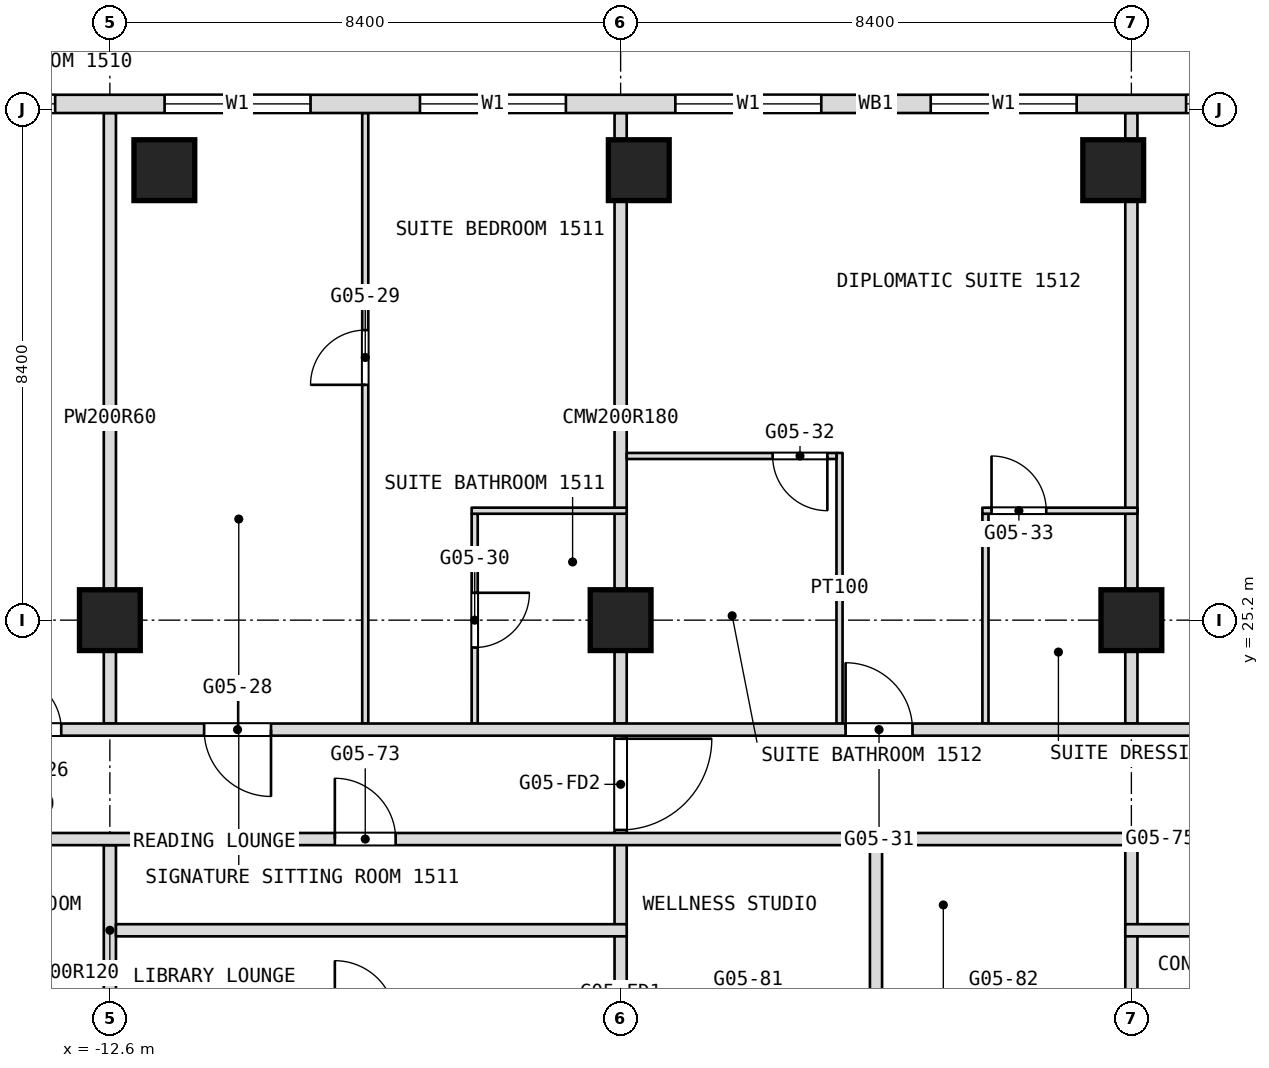
"""IFC4 building model, lengths in metres.
Left out: names, types, materials, properties, quantities, classifications, styles, units other than length and angle.
Written with IfcOpenShell. Run it as: python <this file> out.ifc"""

import sys

from ifc_helpers import new_model, si_unit, direction, frame, frame_2d, origin, origin_2d, place, context, subcontext, project, spatial, rectangle, extrude, element, fill, save


model = new_model("IFC4")
c1 = context("Model", 3, precision=1e-05, world=origin(), true_north=direction((0.0, 1.0)))
c2 = subcontext(c1, "Body", "Model", "MODEL_VIEW")
j1 = project(units=[si_unit("LENGTHUNIT", "METRE"), si_unit("PLANEANGLEUNIT", "RADIAN")], contexts=[c1])
p1 = place(None, origin())
s1 = spatial("IfcSite", under=j1, at=p1, CompositionType="ELEMENT")
p2 = place(p1, origin())
s2 = spatial("IfcBuilding", under=s1, at=p2, CompositionType="ELEMENT")
p3 = place(p2, frame((0.0, 0.0, 68.9)))
s3 = spatial("IfcBuildingStorey", under=s2, at=p3, CompositionType="ELEMENT", Elevation=68.9)
for number, where, z_axis, x_axis in (
    (1, (-12.6, 25.2, 0.0), (0.0, 0.0, 1.0), (1.0, 0.0, 0.0)),
    (2, (-4.2, 25.2, 0.0), (0.0, 0.0, 1.0), (1.0, 0.0, 0.0)),
    (3, (4.2, 25.2, 0.0), (0.0, 0.0, 1.0), (1.0, 0.0, 0.0)),
    (4, (-11.704, 32.6, 0.0), (0.0, 0.0, 1.0), (1.0, 0.0, 0.0)),
    (5, (-3.901, 32.6, 0.0), (0.0, 0.0, 1.0), (1.0, 0.0, 0.0)),
    (6, (3.901, 32.6, 0.0), (0.0, 0.0, 1.0), (1.0, 0.0, 0.0)),
):
    element("IfcColumn", number, at=place(p3, frame(where, z_axis=z_axis, x_axis=x_axis)), inside=s3, PredefinedType="COLUMN", context=c2, shape_type="SweptSolid", body=[
        extrude(rectangle(XDim=1.0, YDim=1.0, at=origin_2d()), origin(), (0.0, 0.0, 1.0), 3.6),
    ])
p4 = place(p3, frame((4.2, 18.7, 0.0), z_axis=(0.0, 0.0, 1.0), x_axis=(0.0, 1.0, 0.0)))
e7 = element("IfcWall", 7, at=p4, inside=s3, PredefinedType="PARTITIONING", context=c2, shape_type="SweptSolid", body=[
    extrude(rectangle(XDim=2.8, YDim=0.2, at=frame_2d((1.4, 0.0))), origin(), (0.0, 0.0, 1.0), 3.34),
])
p5 = place(p3, frame((4.2, 23.5, 0.0), z_axis=(0.0, 0.0, 1.0), x_axis=(0.0, 1.0, 0.0)))
e8 = element("IfcWall", 8, at=p5, inside=s3, PredefinedType="PARTITIONING", context=c2, shape_type="SweptSolid", body=[
    extrude(rectangle(XDim=10.04, YDim=0.2, at=frame_2d((5.02, 0.0))), origin(), (0.0, 0.0, 1.0), 3.34),
])
p6 = place(p3, frame((1.8, 23.5, 0.0), z_axis=(0.0, 0.0, 1.0), x_axis=(0.0, 1.0, 0.0)))
e9 = element("IfcWall", 9, at=p6, inside=s3, PredefinedType="PARTITIONING", context=c2, shape_type="SweptSolid", body=[
    extrude(rectangle(XDim=3.45, YDim=0.1, at=frame_2d((1.725, 0.0))), origin(), (0.0, 0.0, 1.0), 3.34),
])
p7 = place(p3, frame((0.0, 18.7, 0.0), z_axis=(0.0, 0.0, 1.0), x_axis=(0.0, 1.0, 0.0)))
e10 = element("IfcWall", 10, at=p7, inside=s3, PredefinedType="PARTITIONING", context=c2, shape_type="SweptSolid", body=[
    extrude(rectangle(XDim=2.8, YDim=0.2, at=frame_2d((1.4, 0.0))), origin(), (0.0, 0.0, 1.0), 3.34),
])
p8 = place(p3, frame((-0.6, 23.5, 0.0), z_axis=(0.0, 0.0, 1.0), x_axis=(0.0, 1.0, 0.0)))
e11 = element("IfcWall", 11, at=p8, inside=s3, PredefinedType="PARTITIONING", context=c2, shape_type="SweptSolid", body=[
    extrude(rectangle(XDim=4.45, YDim=0.1, at=frame_2d((2.225, 0.0))), origin(), (0.0, 0.0, 1.0), 3.34),
])
p9 = place(p3, frame((-4.2, 16.8, 0.0), z_axis=(0.0, 0.0, 1.0), x_axis=(0.0, 1.0, 0.0)))
e12 = element("IfcWall", 12, at=p9, inside=s3, PredefinedType="PARTITIONING", context=c2, shape_type="SweptSolid", body=[
    extrude(rectangle(XDim=6.7, YDim=0.2, at=frame_2d((3.35, 0.0))), origin(), (0.0, 0.0, 1.0), 3.34),
])
p10 = place(p9, frame((0.15, 0.0, 0.0)))
e13 = element("IfcOpeningElement", 13, at=p10, cuts=e12, PredefinedType="OPENING", context=c2, shape_type="SweptSolid", body=[
    extrude(rectangle(XDim=1.5, YDim=2.1, at=frame_2d((0.75, 1.05))), frame((0.0, 0.1, 0.0), z_axis=(0.0, -1.0, 0.0), x_axis=(1.0, 0.0, 0.0)), (0.0, 0.0, 1.0), 0.2),
])
p11 = place(p9, frame((4.95, 0.0, 0.0)))
e14 = element("IfcOpeningElement", 14, at=p11, cuts=e12, PredefinedType="OPENING", context=c2, shape_type="SweptSolid", body=[
    extrude(rectangle(XDim=1.5, YDim=2.1, at=frame_2d((0.75, 1.05))), frame((0.0, 0.1, 0.0), z_axis=(0.0, -1.0, 0.0), x_axis=(1.0, 0.0, 0.0)), (0.0, 0.0, 1.0), 0.2),
])
p12 = place(p3, frame((-4.2, 23.5, 0.0), z_axis=(0.0, 0.0, 1.0), x_axis=(0.0, 1.0, 0.0)))
e15 = element("IfcWall", 15, at=p12, inside=s3, PredefinedType="PARTITIONING", context=c2, shape_type="SweptSolid", body=[
    extrude(rectangle(XDim=10.04, YDim=0.2, at=frame_2d((5.02, 0.0))), origin(), (0.0, 0.0, 1.0), 3.34),
])
p13 = place(p3, frame((-6.6, 23.5, 0.0), z_axis=(0.0, 0.0, 1.0), x_axis=(0.0, 1.0, 0.0)))
e16 = element("IfcWall", 16, at=p13, inside=s3, PredefinedType="PARTITIONING", context=c2, shape_type="SweptSolid", body=[
    extrude(rectangle(XDim=3.45, YDim=0.1, at=frame_2d((1.725, 0.0))), origin(), (0.0, 0.0, 1.0), 3.34),
])
p14 = place(p13, frame((1.25, 0.0, 0.0)))
e17 = element("IfcOpeningElement", 17, at=p14, cuts=e16, PredefinedType="OPENING", context=c2, shape_type="SweptSolid", body=[
    extrude(rectangle(XDim=0.9, YDim=2.1, at=frame_2d((0.45, 1.05))), frame((0.0, 0.05, 0.0), z_axis=(0.0, -1.0, 0.0), x_axis=(1.0, 0.0, 0.0)), (0.0, 0.0, 1.0), 0.1),
])
p15 = place(p3, frame((-8.4, 23.5, 0.0), z_axis=(0.0, 0.0, 1.0), x_axis=(0.0, 1.0, 0.0)))
e18 = element("IfcWall", 18, at=p15, inside=s3, PredefinedType="PARTITIONING", context=c2, shape_type="SweptSolid", body=[
    extrude(rectangle(XDim=10.04, YDim=0.1, at=frame_2d((5.02, 0.0))), origin(), (0.0, 0.0, 1.0), 3.34),
])
p16 = place(p15, frame((5.57, 0.0, 0.0)))
e19 = element("IfcOpeningElement", 19, at=p16, cuts=e18, PredefinedType="OPENING", context=c2, shape_type="SweptSolid", body=[
    extrude(rectangle(XDim=0.9, YDim=2.1, at=frame_2d((0.45, 1.05))), frame((0.0, 0.05, 0.0), z_axis=(0.0, -1.0, 0.0), x_axis=(1.0, 0.0, 0.0)), (0.0, 0.0, 1.0), 0.1),
])
p17 = place(p3, frame((-12.6, 18.7, 0.0), z_axis=(0.0, 0.0, 1.0), x_axis=(0.0, 1.0, 0.0)))
e20 = element("IfcWall", 20, at=p17, inside=s3, PredefinedType="PARTITIONING", context=c2, shape_type="SweptSolid", body=[
    extrude(rectangle(XDim=2.8, YDim=0.2, at=frame_2d((1.4, 0.0))), origin(), (0.0, 0.0, 1.0), 3.34),
])
p18 = place(p3, frame((-12.6, 23.5, 0.0), z_axis=(0.0, 0.0, 1.0), x_axis=(0.0, 1.0, 0.0)))
e21 = element("IfcWall", 21, at=p18, inside=s3, PredefinedType="PARTITIONING", context=c2, shape_type="SweptSolid", body=[
    extrude(rectangle(XDim=10.04, YDim=0.2, at=frame_2d((5.02, 0.0))), origin(), (0.0, 0.0, 1.0), 3.34),
])
p19 = place(p3, frame((-12.5, 20.1, 0.0), z_axis=(0.0, 0.0, 1.0), x_axis=(1.0, 0.0, 0.0)))
e22 = element("IfcWall", 22, at=p19, inside=s3, PredefinedType="PARTITIONING", context=c2, shape_type="SweptSolid", body=[
    extrude(rectangle(XDim=8.4, YDim=0.2, at=frame_2d((4.2, 0.0))), origin(), (0.0, 0.0, 1.0), 3.34),
])
p20 = place(p3, frame((4.1, 20.1, 0.0), z_axis=(0.0, 0.0, 1.0), x_axis=(1.0, 0.0, 0.0)))
e23 = element("IfcWall", 23, at=p20, inside=s3, PredefinedType="PARTITIONING", context=c2, shape_type="SweptSolid", body=[
    extrude(rectangle(XDim=3.9, YDim=0.2, at=frame_2d((1.95, 0.0))), origin(), (0.0, 0.0, 1.0), 3.34),
])
p21 = place(p3, frame((-16.7, 21.6, 0.0), z_axis=(0.0, 0.0, 1.0), x_axis=(1.0, 0.0, 0.0)))
e24 = element("IfcWall", 24, at=p21, inside=s3, PredefinedType="PARTITIONING", context=c2, shape_type="SweptSolid", body=[
    extrude(rectangle(XDim=24.7, YDim=0.2, at=frame_2d((12.35, 0.0))), origin(), (0.0, 0.0, 1.0), 3.34),
])
p22 = place(p21, frame((7.8, 0.0, 0.0)))
e25 = element("IfcOpeningElement", 25, at=p22, cuts=e24, PredefinedType="OPENING", context=c2, shape_type="SweptSolid", body=[
    extrude(rectangle(XDim=1.0, YDim=2.1, at=frame_2d((0.5, 1.05))), frame((0.0, 0.1, 0.0), z_axis=(0.0, -1.0, 0.0), x_axis=(1.0, 0.0, 0.0)), (0.0, 0.0, 1.0), 0.2),
])
p23 = place(p21, frame((22.25, 0.0, 0.0)))
e26 = element("IfcOpeningElement", 26, at=p23, cuts=e24, PredefinedType="OPENING", context=c2, shape_type="SweptSolid", body=[
    extrude(rectangle(XDim=1.0, YDim=2.1, at=frame_2d((0.5, 1.05))), frame((0.0, 0.1, 0.0), z_axis=(0.0, -1.0, 0.0), x_axis=(1.0, 0.0, 0.0)), (0.0, 0.0, 1.0), 0.2),
])
p24 = place(p3, frame((-16.7, 23.4, 0.0), z_axis=(0.0, 0.0, 1.0), x_axis=(1.0, 0.0, 0.0)))
e27 = element("IfcWall", 27, at=p24, inside=s3, PredefinedType="PARTITIONING", context=c2, shape_type="SweptSolid", body=[
    extrude(rectangle(XDim=23.4, YDim=0.2, at=frame_2d((11.7, 0.0))), origin(), (0.0, 0.0, 1.0), 3.34),
])
p25 = place(p24, frame((2.4, 0.0, 0.0)))
e28 = element("IfcOpeningElement", 28, at=p25, cuts=e27, PredefinedType="OPENING", context=c2, shape_type="SweptSolid", body=[
    extrude(rectangle(XDim=0.9, YDim=2.1, at=frame_2d((0.45, 1.05))), frame((0.0, 0.1, 0.0), z_axis=(0.0, -1.0, 0.0), x_axis=(1.0, 0.0, 0.0)), (0.0, 0.0, 1.0), 0.2),
])
p26 = place(p24, frame((5.65, 0.0, 0.0)))
e29 = element("IfcOpeningElement", 29, at=p26, cuts=e27, PredefinedType="OPENING", context=c2, shape_type="SweptSolid", body=[
    extrude(rectangle(XDim=1.1, YDim=2.1, at=frame_2d((0.55, 1.05))), frame((0.0, 0.1, 0.0), z_axis=(0.0, -1.0, 0.0), x_axis=(1.0, 0.0, 0.0)), (0.0, 0.0, 1.0), 0.2),
])
p27 = place(p24, frame((16.2, 0.0, 0.0)))
e30 = element("IfcOpeningElement", 30, at=p27, cuts=e27, PredefinedType="OPENING", context=c2, shape_type="SweptSolid", body=[
    extrude(rectangle(XDim=1.1, YDim=2.1, at=frame_2d((0.55, 1.05))), frame((0.0, 0.1, 0.0), z_axis=(0.0, -1.0, 0.0), x_axis=(1.0, 0.0, 0.0)), (0.0, 0.0, 1.0), 0.2),
])
p28 = place(p3, frame((-6.65, 27.0, 0.0), z_axis=(0.0, 0.0, 1.0), x_axis=(1.0, 0.0, 0.0)))
e31 = element("IfcWall", 31, at=p28, inside=s3, PredefinedType="PARTITIONING", context=c2, shape_type="SweptSolid", body=[
    extrude(rectangle(XDim=2.55, YDim=0.1, at=frame_2d((1.275, 0.0))), origin(), (0.0, 0.0, 1.0), 3.34),
])
p29 = place(p3, frame((1.75, 27.0, 0.0), z_axis=(0.0, 0.0, 1.0), x_axis=(1.0, 0.0, 0.0)))
e32 = element("IfcWall", 32, at=p29, inside=s3, PredefinedType="PARTITIONING", context=c2, shape_type="SweptSolid", body=[
    extrude(rectangle(XDim=2.55, YDim=0.1, at=frame_2d((1.275, 0.0))), origin(), (0.0, 0.0, 1.0), 3.34),
])
p30 = place(p29, frame((0.15, 0.0, 0.0)))
e33 = element("IfcOpeningElement", 33, at=p30, cuts=e32, PredefinedType="OPENING", context=c2, shape_type="SweptSolid", body=[
    extrude(rectangle(XDim=0.9, YDim=2.1, at=frame_2d((0.45, 1.05))), frame((0.0, 0.05, 0.0), z_axis=(0.0, -1.0, 0.0), x_axis=(1.0, 0.0, 0.0)), (0.0, 0.0, 1.0), 0.1),
])
p31 = place(p3, frame((-4.1, 27.9, 0.0), z_axis=(0.0, 0.0, 1.0), x_axis=(1.0, 0.0, 0.0)))
e34 = element("IfcWall", 34, at=p31, inside=s3, PredefinedType="PARTITIONING", context=c2, shape_type="SweptSolid", body=[
    extrude(rectangle(XDim=3.45, YDim=0.1, at=frame_2d((1.725, 0.0))), origin(), (0.0, 0.0, 1.0), 3.34),
])
p32 = place(p31, frame((2.4, 0.0, 0.0)))
e35 = element("IfcOpeningElement", 35, at=p32, cuts=e34, PredefinedType="OPENING", context=c2, shape_type="SweptSolid", body=[
    extrude(rectangle(XDim=0.9, YDim=2.1, at=frame_2d((0.45, 1.05))), frame((0.0, 0.05, 0.0), z_axis=(0.0, -1.0, 0.0), x_axis=(1.0, 0.0, 0.0)), (0.0, 0.0, 1.0), 0.1),
])
p33 = place(p3, frame((23.406, 33.69, 0.0), z_axis=(0.0, 0.0, 1.0), x_axis=(-1.0, 0.0, 0.0)))
e36 = element("IfcWall", 36, at=p33, inside=s3, PredefinedType="NOTDEFINED", context=c2, shape_type="SweptSolid", body=[
    extrude(rectangle(XDim=46.812, YDim=0.3, at=frame_2d((23.406, 0.0))), origin(), (0.0, 0.0, 1.0), 3.6),
])
p34 = place(p33, frame((2.186, 0.0, 0.9)))
e37 = element("IfcOpeningElement", 37, at=p34, cuts=e36, PredefinedType="OPENING", context=c2, shape_type="SweptSolid", body=[
    extrude(rectangle(XDim=2.4, YDim=2.1, at=frame_2d((1.2, 1.05))), frame((0.0, 0.15, 0.0), z_axis=(0.0, -1.0, 0.0), x_axis=(1.0, 0.0, 0.0)), (0.0, 0.0, 1.0), 0.3),
])
p35 = place(p33, frame((7.506, 0.0, 0.9)))
e38 = element("IfcOpeningElement", 38, at=p35, cuts=e36, PredefinedType="OPENING", context=c2, shape_type="SweptSolid", body=[
    extrude(rectangle(XDim=2.4, YDim=2.1, at=frame_2d((1.2, 1.05))), frame((0.0, 0.15, 0.0), z_axis=(0.0, -1.0, 0.0), x_axis=(1.0, 0.0, 0.0)), (0.0, 0.0, 1.0), 0.3),
])
p36 = place(p33, frame((11.706, 0.0, 0.9)))
e39 = element("IfcOpeningElement", 39, at=p36, cuts=e36, PredefinedType="OPENING", context=c2, shape_type="SweptSolid", body=[
    extrude(rectangle(XDim=2.4, YDim=2.1, at=frame_2d((1.2, 1.05))), frame((0.0, 0.15, 0.0), z_axis=(0.0, -1.0, 0.0), x_axis=(1.0, 0.0, 0.0)), (0.0, 0.0, 1.0), 0.3),
])
p37 = place(p33, frame((15.906, 0.0, 0.9)))
e40 = element("IfcOpeningElement", 40, at=p37, cuts=e36, PredefinedType="OPENING", context=c2, shape_type="SweptSolid", body=[
    extrude(rectangle(XDim=2.4, YDim=2.1, at=frame_2d((1.2, 1.05))), frame((0.0, 0.15, 0.0), z_axis=(0.0, -1.0, 0.0), x_axis=(1.0, 0.0, 0.0)), (0.0, 0.0, 1.0), 0.3),
])
p38 = place(p33, frame((20.106, 0.0, 0.9)))
e41 = element("IfcOpeningElement", 41, at=p38, cuts=e36, PredefinedType="OPENING", context=c2, shape_type="SweptSolid", body=[
    extrude(rectangle(XDim=2.4, YDim=2.1, at=frame_2d((1.2, 1.05))), frame((0.0, 0.15, 0.0), z_axis=(0.0, -1.0, 0.0), x_axis=(1.0, 0.0, 0.0)), (0.0, 0.0, 1.0), 0.3),
])
p39 = place(p33, frame((24.306, 0.0, 0.9)))
e42 = element("IfcOpeningElement", 42, at=p39, cuts=e36, PredefinedType="OPENING", context=c2, shape_type="SweptSolid", body=[
    extrude(rectangle(XDim=2.4, YDim=2.1, at=frame_2d((1.2, 1.05))), frame((0.0, 0.15, 0.0), z_axis=(0.0, -1.0, 0.0), x_axis=(1.0, 0.0, 0.0)), (0.0, 0.0, 1.0), 0.3),
])
p40 = place(p33, frame((28.506, 0.0, 0.9)))
e43 = element("IfcOpeningElement", 43, at=p40, cuts=e36, PredefinedType="OPENING", context=c2, shape_type="SweptSolid", body=[
    extrude(rectangle(XDim=2.4, YDim=2.1, at=frame_2d((1.2, 1.05))), frame((0.0, 0.15, 0.0), z_axis=(0.0, -1.0, 0.0), x_axis=(1.0, 0.0, 0.0)), (0.0, 0.0, 1.0), 0.3),
])
p41 = place(p33, frame((32.706, 0.0, 0.9)))
e44 = element("IfcOpeningElement", 44, at=p41, cuts=e36, PredefinedType="OPENING", context=c2, shape_type="SweptSolid", body=[
    extrude(rectangle(XDim=2.4, YDim=2.1, at=frame_2d((1.2, 1.05))), frame((0.0, 0.15, 0.0), z_axis=(0.0, -1.0, 0.0), x_axis=(1.0, 0.0, 0.0)), (0.0, 0.0, 1.0), 0.3),
])
p42 = place(p33, frame((36.906, 0.0, 0.9)))
e45 = element("IfcOpeningElement", 45, at=p42, cuts=e36, PredefinedType="OPENING", context=c2, shape_type="SweptSolid", body=[
    extrude(rectangle(XDim=2.4, YDim=2.1, at=frame_2d((1.2, 1.05))), frame((0.0, 0.15, 0.0), z_axis=(0.0, -1.0, 0.0), x_axis=(1.0, 0.0, 0.0)), (0.0, 0.0, 1.0), 0.3),
])
p43 = place(p33, frame((42.226, 0.0, 0.9)))
e46 = element("IfcOpeningElement", 46, at=p43, cuts=e36, PredefinedType="OPENING", context=c2, shape_type="SweptSolid", body=[
    extrude(rectangle(XDim=2.4, YDim=2.1, at=frame_2d((1.2, 1.05))), frame((0.0, 0.15, 0.0), z_axis=(0.0, -1.0, 0.0), x_axis=(1.0, 0.0, 0.0)), (0.0, 0.0, 1.0), 0.3),
])
p44 = place(p14, origin())
e47 = element("IfcDoor", 47, at=p44, inside=s3, OperationType="SINGLE_SWING_RIGHT", PredefinedType="DOOR", context=c2, shape_type="SweptSolid", body=[
    extrude(rectangle(XDim=0.9, YDim=2.1, at=frame_2d((0.45, 1.05))), frame((0.0, 0.025, 0.0), z_axis=(0.0, -1.0, 0.0), x_axis=(1.0, 0.0, 0.0)), (0.0, 0.0, 1.0), 0.05),
])
fill(e17, e47)
p45 = place(p16, origin())
e48 = element("IfcDoor", 48, at=p45, inside=s3, OperationType="SINGLE_SWING_RIGHT", PredefinedType="DOOR", context=c2, shape_type="SweptSolid", body=[
    extrude(rectangle(XDim=0.9, YDim=2.1, at=frame_2d((0.45, 1.05))), frame((0.0, 0.025, 0.0), z_axis=(0.0, -1.0, 0.0), x_axis=(1.0, 0.0, 0.0)), (0.0, 0.0, 1.0), 0.05),
])
fill(e19, e48)
p46 = place(p22, origin())
e49 = element("IfcDoor", 49, at=p46, inside=s3, OperationType="SINGLE_SWING_RIGHT", PredefinedType="DOOR", context=c2, shape_type="SweptSolid", body=[
    extrude(rectangle(XDim=1.0, YDim=2.1, at=frame_2d((0.5, 1.05))), frame((0.0, 0.025, 0.0), z_axis=(0.0, -1.0, 0.0), x_axis=(1.0, 0.0, 0.0)), (0.0, 0.0, 1.0), 0.05),
])
fill(e25, e49)
p47 = place(p25, origin())
e50 = element("IfcDoor", 50, at=p47, inside=s3, OperationType="SINGLE_SWING_LEFT", PredefinedType="DOOR", context=c2, shape_type="SweptSolid", body=[
    extrude(rectangle(XDim=0.9, YDim=2.1, at=frame_2d((0.45, 1.05))), frame((0.0, 0.025, 0.0), z_axis=(0.0, -1.0, 0.0), x_axis=(1.0, 0.0, 0.0)), (0.0, 0.0, 1.0), 0.05),
])
fill(e28, e50)
p48 = place(p26, origin())
e51 = element("IfcDoor", 51, at=p48, inside=s3, OperationType="SINGLE_SWING_LEFT", PredefinedType="DOOR", context=c2, shape_type="SweptSolid", body=[
    extrude(rectangle(XDim=1.1, YDim=2.1, at=frame_2d((0.55, 1.05))), frame((0.0, 0.025, 0.0), z_axis=(0.0, -1.0, 0.0), x_axis=(1.0, 0.0, 0.0)), (0.0, 0.0, 1.0), 0.05),
])
fill(e29, e51)
p49 = place(p27, origin())
e52 = element("IfcDoor", 52, at=p49, inside=s3, OperationType="SINGLE_SWING_LEFT", PredefinedType="DOOR", context=c2, shape_type="SweptSolid", body=[
    extrude(rectangle(XDim=1.1, YDim=2.1, at=frame_2d((0.55, 1.05))), frame((0.0, 0.025, 0.0), z_axis=(0.0, -1.0, 0.0), x_axis=(1.0, 0.0, 0.0)), (0.0, 0.0, 1.0), 0.05),
])
fill(e30, e52)
p50 = place(p30, origin())
e53 = element("IfcDoor", 53, at=p50, inside=s3, OperationType="SINGLE_SWING_RIGHT", PredefinedType="DOOR", context=c2, shape_type="SweptSolid", body=[
    extrude(rectangle(XDim=0.9, YDim=2.1, at=frame_2d((0.45, 1.05))), frame((0.0, 0.025, 0.0), z_axis=(0.0, -1.0, 0.0), x_axis=(1.0, 0.0, 0.0)), (0.0, 0.0, 1.0), 0.05),
])
fill(e33, e53)
p51 = place(p32, origin())
e54 = element("IfcDoor", 54, at=p51, inside=s3, OperationType="SINGLE_SWING_LEFT", PredefinedType="DOOR", context=c2, shape_type="SweptSolid", body=[
    extrude(rectangle(XDim=0.9, YDim=2.1, at=frame_2d((0.45, 1.05))), frame((0.0, 0.025, 0.0), z_axis=(0.0, -1.0, 0.0), x_axis=(1.0, 0.0, 0.0)), (0.0, 0.0, 1.0), 0.05),
])
fill(e35, e54)
p52 = place(p37, origin())
e55 = element("IfcWindow", 55, at=p52, inside=s3, PartitioningType="SINGLE_PANEL", PredefinedType="WINDOW", context=c2, shape_type="SweptSolid", body=[
    extrude(rectangle(XDim=2.4, YDim=2.1, at=frame_2d((1.2, 1.05))), frame((0.0, 0.03, 0.0), z_axis=(0.0, -1.0, 0.0), x_axis=(1.0, 0.0, 0.0)), (0.0, 0.0, 1.0), 0.06),
])
fill(e40, e55)
p53 = place(p38, origin())
e56 = element("IfcWindow", 56, at=p53, inside=s3, PartitioningType="SINGLE_PANEL", PredefinedType="WINDOW", context=c2, shape_type="SweptSolid", body=[
    extrude(rectangle(XDim=2.4, YDim=2.1, at=frame_2d((1.2, 1.05))), frame((0.0, 0.03, 0.0), z_axis=(0.0, -1.0, 0.0), x_axis=(1.0, 0.0, 0.0)), (0.0, 0.0, 1.0), 0.06),
])
fill(e41, e56)
p54 = place(p39, origin())
e57 = element("IfcWindow", 57, at=p54, inside=s3, PartitioningType="SINGLE_PANEL", PredefinedType="WINDOW", context=c2, shape_type="SweptSolid", body=[
    extrude(rectangle(XDim=2.4, YDim=2.1, at=frame_2d((1.2, 1.05))), frame((0.0, 0.03, 0.0), z_axis=(0.0, -1.0, 0.0), x_axis=(1.0, 0.0, 0.0)), (0.0, 0.0, 1.0), 0.06),
])
fill(e42, e57)
p55 = place(p40, origin())
e58 = element("IfcWindow", 58, at=p55, inside=s3, PartitioningType="SINGLE_PANEL", PredefinedType="WINDOW", context=c2, shape_type="SweptSolid", body=[
    extrude(rectangle(XDim=2.4, YDim=2.1, at=frame_2d((1.2, 1.05))), frame((0.0, 0.03, 0.0), z_axis=(0.0, -1.0, 0.0), x_axis=(1.0, 0.0, 0.0)), (0.0, 0.0, 1.0), 0.06),
])
fill(e43, e58)
p56 = place(p41, origin())
e59 = element("IfcWindow", 59, at=p56, inside=s3, PartitioningType="SINGLE_PANEL", PredefinedType="WINDOW", context=c2, shape_type="SweptSolid", body=[
    extrude(rectangle(XDim=2.4, YDim=2.1, at=frame_2d((1.2, 1.05))), frame((0.0, 0.03, 0.0), z_axis=(0.0, -1.0, 0.0), x_axis=(1.0, 0.0, 0.0)), (0.0, 0.0, 1.0), 0.06),
])
fill(e44, e59)
p57 = place(p42, origin())
e60 = element("IfcWindow", 60, at=p57, inside=s3, PartitioningType="SINGLE_PANEL", PredefinedType="WINDOW", context=c2, shape_type="SweptSolid", body=[
    extrude(rectangle(XDim=2.4, YDim=2.1, at=frame_2d((1.2, 1.05))), frame((0.0, 0.03, 0.0), z_axis=(0.0, -1.0, 0.0), x_axis=(1.0, 0.0, 0.0)), (0.0, 0.0, 1.0), 0.06),
])
fill(e45, e60)
p58 = place(p11, origin())
e61 = element("IfcDoor", 61, at=p58, inside=s3, OperationType="DOUBLE_DOOR_DOUBLE_SWING", PredefinedType="DOOR", context=c2, shape_type="SweptSolid", body=[
    extrude(rectangle(XDim=1.5, YDim=2.1, at=frame_2d((0.75, 1.05))), frame((0.0, 0.025, 0.0), z_axis=(0.0, -1.0, 0.0), x_axis=(1.0, 0.0, 0.0)), (0.0, 0.0, 1.0), 0.05),
])
fill(e14, e61)
save(model, sys.argv[1])
